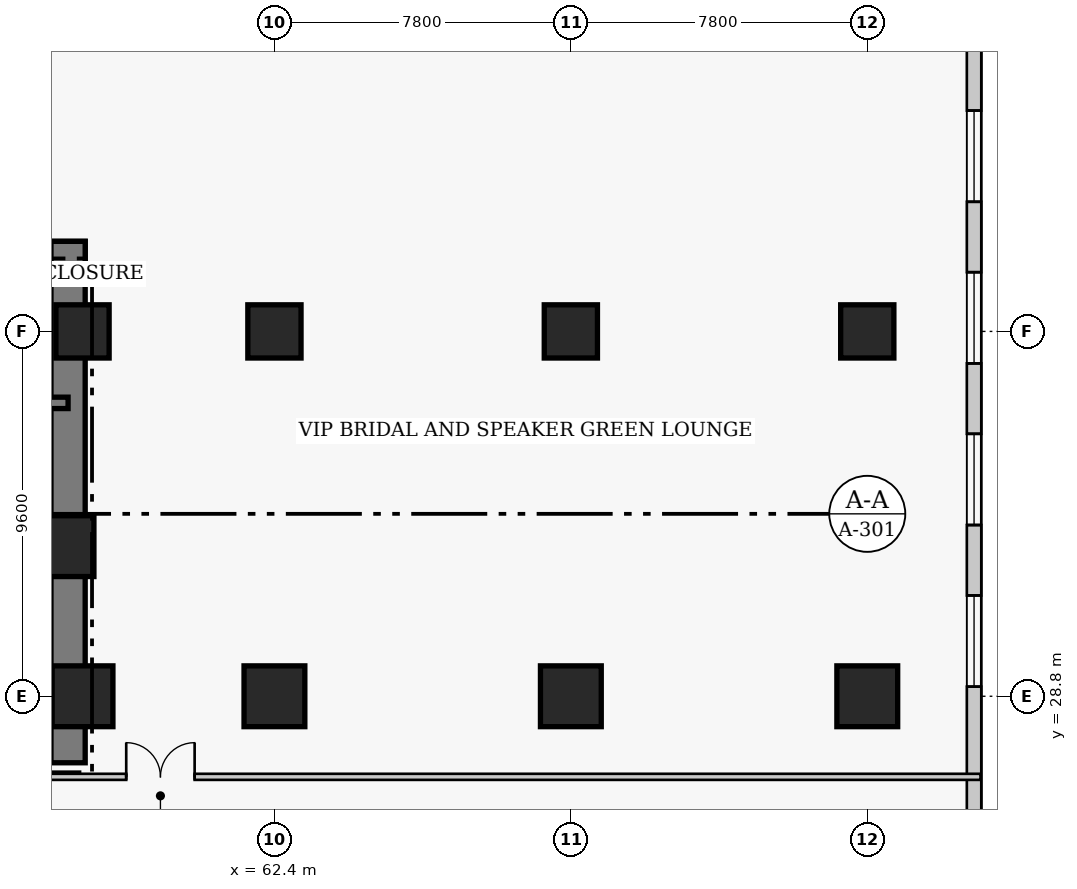
"""IFC4 building model, lengths in metres.
Left out: names, types, materials, properties, quantities, classifications, styles, units other than length and angle.
Written with IfcOpenShell. Run it as: python <this file> out.ifc"""

import sys

from ifc_helpers import new_model, si_unit, direction, frame, frame_2d, origin, origin_2d, place, context, subcontext, project, spatial, rectangle, extrude, element, fill, save


model = new_model("IFC4")
c1 = context("Model", 3, precision=1e-05, world=origin(), true_north=direction((0.0, 1.0)))
c2 = subcontext(c1, "Body", "Model", "MODEL_VIEW")
j1 = project(units=[si_unit("LENGTHUNIT", "METRE"), si_unit("PLANEANGLEUNIT", "RADIAN")], contexts=[c1])
p1 = place(None, origin())
s1 = spatial("IfcSite", under=j1, at=p1, CompositionType="ELEMENT")
p2 = place(p1, origin())
s2 = spatial("IfcBuilding", under=s1, at=p2, CompositionType="ELEMENT")
p3 = place(p2, frame((0.0, 0.0, 10.4)))
s3 = spatial("IfcBuildingStorey", under=s2, at=p3, CompositionType="ELEMENT", Elevation=10.4)
p4 = place(p3, frame((48.45, 40.32, 0.0), z_axis=(0.0, 0.0, 1.0), x_axis=(1.0, 0.0, 0.0)))
e1 = element("IfcWall", 1, at=p4, inside=s3, PredefinedType="SHEAR", context=c2, shape_type="SweptSolid", body=[
    extrude(rectangle(XDim=8.97, YDim=0.9, at=frame_2d((4.485, 0.0))), origin(), (0.0, 0.0, 1.0), 5.4),
])
p5 = place(p3, frame((56.97, 27.05, 0.0), z_axis=(0.0, 0.0, 1.0), x_axis=(0.0, 1.0, 0.0)))
e2 = element("IfcWall", 2, at=p5, inside=s3, PredefinedType="SHEAR", context=c2, shape_type="SweptSolid", body=[
    extrude(rectangle(XDim=13.72, YDim=0.9, at=frame_2d((6.86, 0.0))), origin(), (0.0, 0.0, 1.0), 5.4),
])
p6 = place(p3, frame((48.45, 36.52, 0.0), z_axis=(0.0, 0.0, 1.0), x_axis=(1.0, 0.0, 0.0)))
e3 = element("IfcWall", 3, at=p6, inside=s3, PredefinedType="SHEAR", context=c2, shape_type="SweptSolid", body=[
    extrude(rectangle(XDim=8.52, YDim=0.3, at=frame_2d((4.26, 0.0))), origin(), (0.0, 0.0, 1.0), 5.4),
])
p7 = place(p3, frame((62.4, 28.8, 0.0), z_axis=(0.0, 0.0, 1.0), x_axis=(1.0, 0.0, 0.0)))
e4 = element("IfcColumn", 4, at=p7, inside=s3, PredefinedType="COLUMN", context=c2, shape_type="SweptSolid", body=[
    extrude(rectangle(XDim=1.6, YDim=1.6, at=origin_2d()), origin(), (0.0, 0.0, 1.0), 5.4),
])
p8 = place(p3, frame((62.4, 38.4, 0.0), z_axis=(0.0, 0.0, 1.0), x_axis=(1.0, 0.0, 0.0)))
e5 = element("IfcColumn", 5, at=p8, inside=s3, PredefinedType="COLUMN", context=c2, shape_type="SweptSolid", body=[
    extrude(rectangle(XDim=1.4, YDim=1.4, at=origin_2d()), origin(), (0.0, 0.0, 1.0), 5.4),
])
p9 = place(p3, frame((70.2, 28.8, 0.0), z_axis=(0.0, 0.0, 1.0), x_axis=(1.0, 0.0, 0.0)))
e6 = element("IfcColumn", 6, at=p9, inside=s3, PredefinedType="COLUMN", context=c2, shape_type="SweptSolid", body=[
    extrude(rectangle(XDim=1.6, YDim=1.6, at=origin_2d()), origin(), (0.0, 0.0, 1.0), 5.4),
])
p10 = place(p3, frame((70.2, 38.4, 0.0), z_axis=(0.0, 0.0, 1.0), x_axis=(1.0, 0.0, 0.0)))
e7 = element("IfcColumn", 7, at=p10, inside=s3, PredefinedType="COLUMN", context=c2, shape_type="SweptSolid", body=[
    extrude(rectangle(XDim=1.4, YDim=1.4, at=origin_2d()), origin(), (0.0, 0.0, 1.0), 5.4),
])
p11 = place(p3, frame((78.0, 28.8, 0.0), z_axis=(0.0, 0.0, 1.0), x_axis=(1.0, 0.0, 0.0)))
e8 = element("IfcColumn", 8, at=p11, inside=s3, PredefinedType="COLUMN", context=c2, shape_type="SweptSolid", body=[
    extrude(rectangle(XDim=1.6, YDim=1.6, at=origin_2d()), origin(), (0.0, 0.0, 1.0), 5.4),
])
p12 = place(p3, frame((78.0, 38.4, 0.0), z_axis=(0.0, 0.0, 1.0), x_axis=(1.0, 0.0, 0.0)))
e9 = element("IfcColumn", 9, at=p12, inside=s3, PredefinedType="COLUMN", context=c2, shape_type="SweptSolid", body=[
    extrude(rectangle(XDim=1.4, YDim=1.4, at=origin_2d()), origin(), (0.0, 0.0, 1.0), 5.4),
])
p13 = place(p3, frame((57.35, 28.8, 0.0), z_axis=(0.0, 0.0, 1.0), x_axis=(1.0, 0.0, 0.0)))
e10 = element("IfcColumn", 10, at=p13, inside=s3, PredefinedType="COLUMN", context=c2, shape_type="SweptSolid", body=[
    extrude(rectangle(XDim=1.6, YDim=1.6, at=origin_2d()), origin(), (0.0, 0.0, 1.0), 5.4),
])
p14 = place(p3, frame((57.35, 38.4, 0.0), z_axis=(0.0, 0.0, 1.0), x_axis=(1.0, 0.0, 0.0)))
e11 = element("IfcColumn", 11, at=p14, inside=s3, PredefinedType="COLUMN", context=c2, shape_type="SweptSolid", body=[
    extrude(rectangle(XDim=1.4, YDim=1.4, at=origin_2d()), origin(), (0.0, 0.0, 1.0), 5.4),
])
p15 = place(p3, frame((56.85, 32.75, 0.0), z_axis=(0.0, 0.0, 1.0), x_axis=(1.0, 0.0, 0.0)))
e12 = element("IfcColumn", 12, at=p15, inside=s3, PredefinedType="COLUMN", context=c2, shape_type="SweptSolid", body=[
    extrude(rectangle(XDim=1.6, YDim=1.6, at=origin_2d()), origin(), (0.0, 0.0, 1.0), 5.4),
])
p16 = place(p3, frame((80.81, 2.61, 0.0), z_axis=(0.0, 0.0, 1.0), x_axis=(0.0, 1.0, 0.0)))
e13 = element("IfcWall", 13, at=p16, inside=s3, PredefinedType="SOLIDWALL", context=c2, shape_type="SweptSolid", body=[
    extrude(rectangle(XDim=46.78, YDim=0.38, at=frame_2d((23.39, 0.0))), origin(), (0.0, 0.0, 1.0), 5.1),
])
p17 = place(p16, frame((0.927, 0.0, 0.75)))
e14 = element("IfcOpeningElement", 14, at=p17, cuts=e13, PredefinedType="OPENING", context=c2, shape_type="SweptSolid", body=[
    extrude(rectangle(XDim=2.4, YDim=2.2, at=frame_2d((1.2, 1.1))), frame((0.0, 0.2, 0.0), z_axis=(0.0, -1.0, 0.0), x_axis=(1.0, 0.0, 0.0)), (0.0, 0.0, 1.0), 0.4),
])
p18 = place(p16, frame((5.179, 0.0, 0.75)))
e15 = element("IfcOpeningElement", 15, at=p18, cuts=e13, PredefinedType="OPENING", context=c2, shape_type="SweptSolid", body=[
    extrude(rectangle(XDim=2.4, YDim=2.2, at=frame_2d((1.2, 1.1))), frame((0.0, 0.2, 0.0), z_axis=(0.0, -1.0, 0.0), x_axis=(1.0, 0.0, 0.0)), (0.0, 0.0, 1.0), 0.4),
])
p19 = place(p16, frame((9.432, 0.0, 0.75)))
e16 = element("IfcOpeningElement", 16, at=p19, cuts=e13, PredefinedType="OPENING", context=c2, shape_type="SweptSolid", body=[
    extrude(rectangle(XDim=2.4, YDim=2.2, at=frame_2d((1.2, 1.1))), frame((0.0, 0.2, 0.0), z_axis=(0.0, -1.0, 0.0), x_axis=(1.0, 0.0, 0.0)), (0.0, 0.0, 1.0), 0.4),
])
p20 = place(p16, frame((13.034, 0.0, 0.75)))
e17 = element("IfcOpeningElement", 17, at=p20, cuts=e13, PredefinedType="OPENING", context=c2, shape_type="SweptSolid", body=[
    extrude(rectangle(XDim=2.4, YDim=2.2, at=frame_2d((1.2, 1.1))), frame((0.0, 0.2, 0.0), z_axis=(0.0, -1.0, 0.0), x_axis=(1.0, 0.0, 0.0)), (0.0, 0.0, 1.0), 0.4),
])
p21 = place(p16, frame((17.937, 0.0, 0.75)))
e18 = element("IfcOpeningElement", 18, at=p21, cuts=e13, PredefinedType="OPENING", context=c2, shape_type="SweptSolid", body=[
    extrude(rectangle(XDim=2.4, YDim=2.2, at=frame_2d((1.2, 1.1))), frame((0.0, 0.2, 0.0), z_axis=(0.0, -1.0, 0.0), x_axis=(1.0, 0.0, 0.0)), (0.0, 0.0, 1.0), 0.4),
])
p22 = place(p16, frame((26.443, 0.0, 0.75)))
e19 = element("IfcOpeningElement", 19, at=p22, cuts=e13, PredefinedType="OPENING", context=c2, shape_type="SweptSolid", body=[
    extrude(rectangle(XDim=2.4, YDim=2.2, at=frame_2d((1.2, 1.1))), frame((0.0, 0.2, 0.0), z_axis=(0.0, -1.0, 0.0), x_axis=(1.0, 0.0, 0.0)), (0.0, 0.0, 1.0), 0.4),
])
p23 = place(p16, frame((30.696, 0.0, 0.75)))
e20 = element("IfcOpeningElement", 20, at=p23, cuts=e13, PredefinedType="OPENING", context=c2, shape_type="SweptSolid", body=[
    extrude(rectangle(XDim=2.4, YDim=2.2, at=frame_2d((1.2, 1.1))), frame((0.0, 0.2, 0.0), z_axis=(0.0, -1.0, 0.0), x_axis=(1.0, 0.0, 0.0)), (0.0, 0.0, 1.0), 0.4),
])
p24 = place(p16, frame((34.948, 0.0, 0.75)))
e21 = element("IfcOpeningElement", 21, at=p24, cuts=e13, PredefinedType="OPENING", context=c2, shape_type="SweptSolid", body=[
    extrude(rectangle(XDim=2.4, YDim=2.2, at=frame_2d((1.2, 1.1))), frame((0.0, 0.2, 0.0), z_axis=(0.0, -1.0, 0.0), x_axis=(1.0, 0.0, 0.0)), (0.0, 0.0, 1.0), 0.4),
])
p25 = place(p16, frame((39.201, 0.0, 0.75)))
e22 = element("IfcOpeningElement", 22, at=p25, cuts=e13, PredefinedType="OPENING", context=c2, shape_type="SweptSolid", body=[
    extrude(rectangle(XDim=2.4, YDim=2.2, at=frame_2d((1.2, 1.1))), frame((0.0, 0.2, 0.0), z_axis=(0.0, -1.0, 0.0), x_axis=(1.0, 0.0, 0.0)), (0.0, 0.0, 1.0), 0.4),
])
p26 = place(p16, frame((43.454, 0.0, 0.75)))
e23 = element("IfcOpeningElement", 23, at=p26, cuts=e13, PredefinedType="OPENING", context=c2, shape_type="SweptSolid", body=[
    extrude(rectangle(XDim=2.4, YDim=2.2, at=frame_2d((1.2, 1.1))), frame((0.0, 0.2, 0.0), z_axis=(0.0, -1.0, 0.0), x_axis=(1.0, 0.0, 0.0)), (0.0, 0.0, 1.0), 0.4),
])
p27 = place(p3, frame((51.12, 29.5, 0.0), z_axis=(0.0, 0.0, 1.0), x_axis=(1.0, 0.0, 0.0)))
e24 = element("IfcWall", 24, at=p27, inside=s3, PredefinedType="PARTITIONING", context=c2, shape_type="SweptSolid", body=[
    extrude(rectangle(XDim=5.63, YDim=0.16, at=frame_2d((2.815, 0.0))), origin(), (0.0, 0.0, 1.0), 5.1),
])
p28 = place(p3, frame((-2.98, 26.68, 0.0), z_axis=(0.0, 0.0, 1.0), x_axis=(1.0, 0.0, 0.0)))
e25 = element("IfcWall", 25, at=p28, inside=s3, PredefinedType="PARTITIONING", context=c2, shape_type="SweptSolid", body=[
    extrude(rectangle(XDim=83.96, YDim=0.16, at=frame_2d((41.98, 0.0))), origin(), (0.0, 0.0, 1.0), 5.1),
])
p29 = place(p28, frame((41.08, 0.0, 0.0)))
e26 = element("IfcOpeningElement", 26, at=p29, cuts=e25, PredefinedType="OPENING", context=c2, shape_type="SweptSolid", body=[
    extrude(rectangle(XDim=1.8, YDim=2.2, at=frame_2d((0.9, 1.1))), frame((0.0, 0.09, 0.0), z_axis=(0.0, -1.0, 0.0), x_axis=(1.0, 0.0, 0.0)), (0.0, 0.0, 1.0), 0.18),
])
p30 = place(p28, frame((4.042, 0.0, 0.0)))
e27 = element("IfcOpeningElement", 27, at=p30, cuts=e25, PredefinedType="OPENING", context=c2, shape_type="SweptSolid", body=[
    extrude(rectangle(XDim=1.8, YDim=2.2, at=frame_2d((0.9, 1.1))), frame((0.0, 0.09, 0.0), z_axis=(0.0, -1.0, 0.0), x_axis=(1.0, 0.0, 0.0)), (0.0, 0.0, 1.0), 0.18),
])
p31 = place(p28, frame((61.48, 0.0, 0.0)))
e28 = element("IfcOpeningElement", 28, at=p31, cuts=e25, PredefinedType="OPENING", context=c2, shape_type="SweptSolid", body=[
    extrude(rectangle(XDim=1.8, YDim=2.2, at=frame_2d((0.9, 1.1))), frame((0.0, 0.09, 0.0), z_axis=(0.0, -1.0, 0.0), x_axis=(1.0, 0.0, 0.0)), (0.0, 0.0, 1.0), 0.18),
])
p32 = place(p22, origin())
e29 = element("IfcWindow", 29, at=p32, inside=s3, PartitioningType="SINGLE_PANEL", PredefinedType="WINDOW", context=c2, shape_type="SweptSolid", body=[
    extrude(rectangle(XDim=2.4, YDim=2.2, at=frame_2d((1.2, 1.1))), frame((0.0, 0.03, 0.0), z_axis=(0.0, -1.0, 0.0), x_axis=(1.0, 0.0, 0.0)), (0.0, 0.0, 1.0), 0.06),
])
fill(e19, e29)
p33 = place(p23, origin())
e30 = element("IfcWindow", 30, at=p33, inside=s3, PartitioningType="SINGLE_PANEL", PredefinedType="WINDOW", context=c2, shape_type="SweptSolid", body=[
    extrude(rectangle(XDim=2.4, YDim=2.2, at=frame_2d((1.2, 1.1))), frame((0.0, 0.03, 0.0), z_axis=(0.0, -1.0, 0.0), x_axis=(1.0, 0.0, 0.0)), (0.0, 0.0, 1.0), 0.06),
])
fill(e20, e30)
p34 = place(p24, origin())
e31 = element("IfcWindow", 31, at=p34, inside=s3, PartitioningType="SINGLE_PANEL", PredefinedType="WINDOW", context=c2, shape_type="SweptSolid", body=[
    extrude(rectangle(XDim=2.4, YDim=2.2, at=frame_2d((1.2, 1.1))), frame((0.0, 0.03, 0.0), z_axis=(0.0, -1.0, 0.0), x_axis=(1.0, 0.0, 0.0)), (0.0, 0.0, 1.0), 0.06),
])
fill(e21, e31)
p35 = place(p25, origin())
e32 = element("IfcWindow", 32, at=p35, inside=s3, PartitioningType="SINGLE_PANEL", PredefinedType="WINDOW", context=c2, shape_type="SweptSolid", body=[
    extrude(rectangle(XDim=2.4, YDim=2.2, at=frame_2d((1.2, 1.1))), frame((0.0, 0.03, 0.0), z_axis=(0.0, -1.0, 0.0), x_axis=(1.0, 0.0, 0.0)), (0.0, 0.0, 1.0), 0.06),
])
fill(e22, e32)
p36 = place(p31, origin())
e33 = element("IfcDoor", 33, at=p36, inside=s3, OperationType="DOUBLE_DOOR_SINGLE_SWING", PredefinedType="DOOR", context=c2, shape_type="SweptSolid", body=[
    extrude(rectangle(XDim=1.8, YDim=2.2, at=frame_2d((0.9, 1.1))), frame((0.0, 0.025, 0.0), z_axis=(0.0, -1.0, 0.0), x_axis=(1.0, 0.0, 0.0)), (0.0, 0.0, 1.0), 0.05),
])
fill(e28, e33)
save(model, sys.argv[1])
